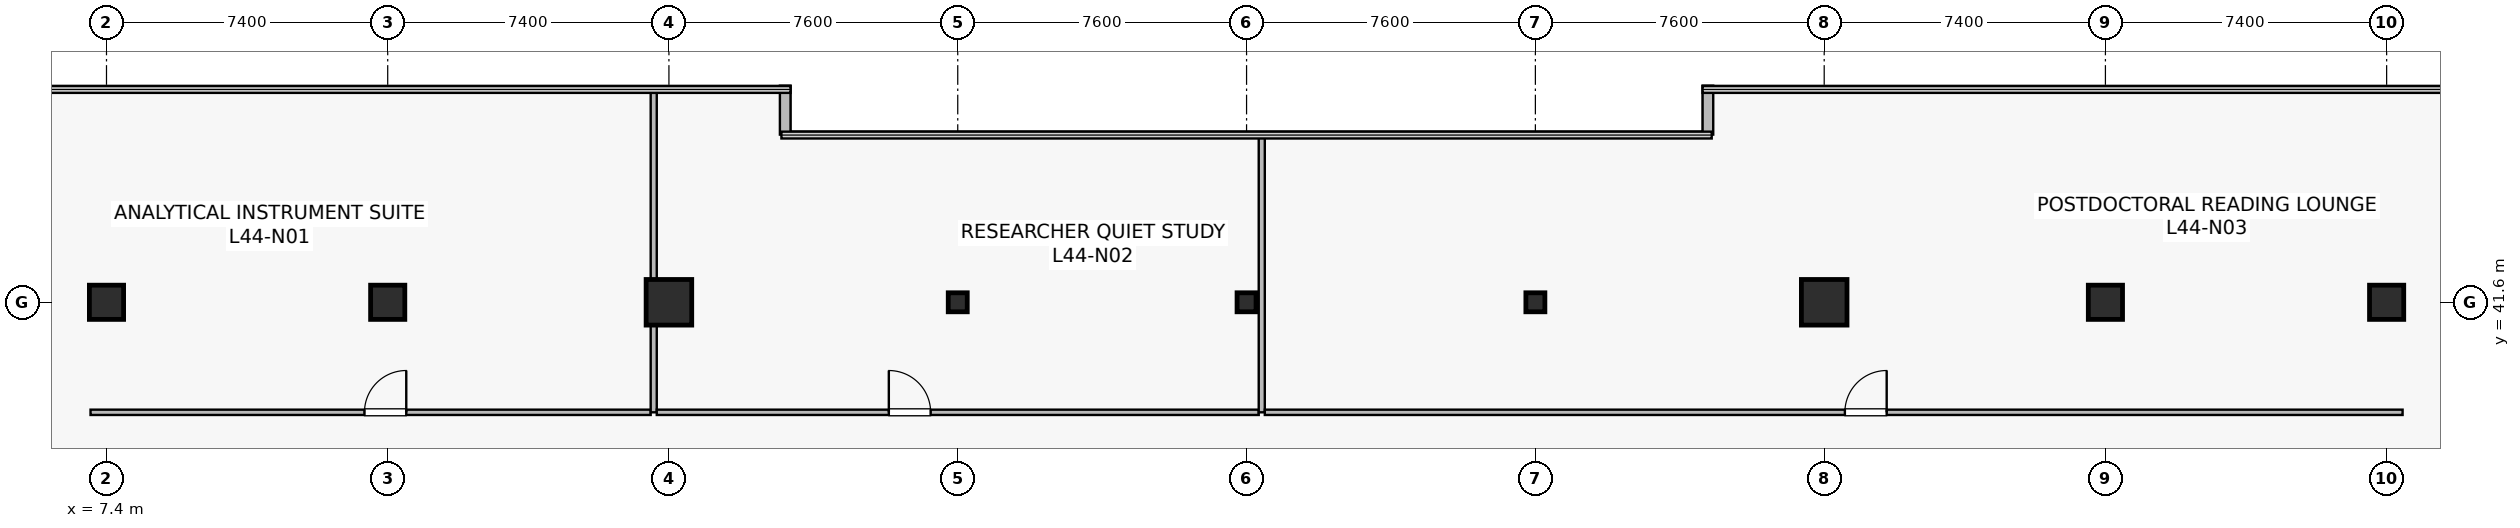
"""IFC4 building model, lengths in metres.
Left out: names, types, materials, properties, quantities, classifications, styles, units other than length and angle.
Written with IfcOpenShell. Run it as: python <this file> out.ifc"""

import sys

from ifc_helpers import new_model, si_unit, direction, frame, frame_2d, origin, origin_2d, place, context, subcontext, project, spatial, rectangle, hollow_rectangle, extrude, source, transform, mapped, element, fill, save


model = new_model("IFC4")
c1 = context("Model", 3, precision=1e-05, world=origin(), true_north=direction((0.0, 1.0)))
c2 = subcontext(c1, "Body", "Model", "MODEL_VIEW")
j1 = project(units=[si_unit("LENGTHUNIT", "METRE"), si_unit("PLANEANGLEUNIT", "RADIAN")], contexts=[c1])
p1 = place(None, origin())
s1 = spatial("IfcSite", under=j1, at=p1, CompositionType="ELEMENT")
p2 = place(p1, origin())
s2 = spatial("IfcBuilding", under=s1, at=p2, CompositionType="ELEMENT")
p3 = place(p2, frame((0.0, 0.0, 183.0)))
s3 = spatial("IfcBuildingStorey", under=s2, at=p3, CompositionType="ELEMENT", Elevation=183.0)
m1 = source(origin(), c2, "Body", "SweptSolid", [
    extrude(rectangle(XDim=0.9, YDim=0.9, at=origin_2d()), origin(), (0.0, 0.0, 1.0), 4.1),
])
p4 = place(p3, frame((14.8, 41.6, 0.0), z_axis=(0.0, 0.0, 1.0), x_axis=(1.0, 0.0, 0.0)))
e1 = element("IfcColumn", 1, at=p4, inside=s3, PredefinedType="COLUMN", context=c2, shape_type="MappedRepresentation", body=[
    mapped(m1, transform((0.0, 0.0, 0.0), scale=1.0)),
])
m2 = source(origin(), c2, "Body", "SweptSolid", [
    extrude(rectangle(XDim=1.2, YDim=1.2, at=origin_2d()), origin(), (0.0, 0.0, 1.0), 4.1),
])
for number, where, z_axis, x_axis in (
    (2, (22.2, 41.6, 0.0), (0.0, 0.0, 1.0), (1.0, 0.0, 0.0)),
    (3, (52.6, 41.6, 0.0), (0.0, 0.0, 1.0), (1.0, 0.0, 0.0)),
):
    element("IfcColumn", number, at=place(p3, frame(where, z_axis=z_axis, x_axis=x_axis)), inside=s3, PredefinedType="COLUMN", context=c2, shape_type="MappedRepresentation", body=[
        mapped(m2, transform((0.0, 0.0, 0.0), scale=1.0)),
    ])
for number, where, z_axis, x_axis in (
    (4, (60.0, 41.6, 0.0), (0.0, 0.0, 1.0), (1.0, 0.0, 0.0)),
    (5, (7.4, 41.6, 0.0), (0.0, 0.0, 1.0), (1.0, 0.0, 0.0)),
    (6, (67.4, 41.6, 0.0), (0.0, 0.0, 1.0), (1.0, 0.0, 0.0)),
):
    element("IfcColumn", number, at=place(p3, frame(where, z_axis=z_axis, x_axis=x_axis)), inside=s3, PredefinedType="COLUMN", context=c2, shape_type="MappedRepresentation", body=[
        mapped(m1, transform((0.0, 0.0, 0.0), scale=1.0)),
    ])
m3 = source(origin(), c2, "Body", "SweptSolid", [
    extrude(hollow_rectangle(XDim=0.5, YDim=0.5, WallThickness=0.022, at=origin_2d()), origin(), (0.0, 0.0, 1.0), 4.1),
])
for number, where, z_axis, x_axis in (
    (7, (29.8, 41.6, 0.0), (0.0, 0.0, 1.0), (1.0, 0.0, 0.0)),
    (8, (37.4, 41.6, 0.0), (0.0, 0.0, 1.0), (1.0, 0.0, 0.0)),
    (9, (45.0, 41.6, 0.0), (0.0, 0.0, 1.0), (1.0, 0.0, 0.0)),
):
    element("IfcColumn", number, at=place(p3, frame(where, z_axis=z_axis, x_axis=x_axis)), inside=s3, PredefinedType="COLUMN", context=c2, shape_type="MappedRepresentation", body=[
        mapped(m3, transform((0.0, 0.0, 0.0), scale=1.0)),
    ])
for number, where, z_axis, x_axis in (
    (10, (49.54, 47.3, 0.0), (0.0, 0.0, 1.0), (0.0, -1.0, 0.0)),
    (11, (25.26, 46.012, 0.0), (0.0, 0.0, 1.0), (0.0, 1.0, 0.0)),
):
    element("IfcWall", number, at=place(p3, frame(where, z_axis=z_axis, x_axis=x_axis)), inside=s3, PredefinedType="STANDARD", context=c2, shape_type="SweptSolid", body=[
        extrude(rectangle(XDim=1.288, YDim=0.28, at=frame_2d((0.644, 0.0))), origin(), (0.0, 0.0, 1.0), 3.79),
    ])
p5 = place(p3, frame((6.98, 38.705, 0.0), z_axis=(0.0, 0.0, 1.0), x_axis=(1.0, 0.0, 0.0)))
e12 = element("IfcWall", 12, at=p5, inside=s3, PredefinedType="PARTITIONING", context=c2, shape_type="SweptSolid", body=[
    extrude(rectangle(XDim=14.74, YDim=0.14, at=frame_2d((7.37, 0.0))), origin(), (0.0, 0.0, 1.0), 3.187),
])
p6 = place(p5, frame((7.208, 0.0, 0.0)))
e13 = element("IfcOpeningElement", 13, at=p6, cuts=e12, PredefinedType="OPENING", context=c2, shape_type="SweptSolid", body=[
    extrude(rectangle(XDim=1.1, YDim=2.18, at=frame_2d((0.55, 1.09))), frame((0.0, 0.08, 0.0), z_axis=(0.0, -1.0, 0.0), x_axis=(1.0, 0.0, 0.0)), (0.0, 0.0, 1.0), 0.16),
])
p7 = place(p3, frame((21.8, 38.705, 0.0), z_axis=(0.0, 0.0, 1.0), x_axis=(0.0, 1.0, 0.0)))
e14 = element("IfcWall", 14, at=p7, inside=s3, PredefinedType="PARTITIONING", context=c2, shape_type="SweptSolid", body=[
    extrude(rectangle(XDim=8.485, YDim=0.16, at=frame_2d((4.242, 0.0))), origin(), (0.0, 0.0, 1.0), 3.075),
])
p8 = place(p3, frame((21.88, 38.705, 0.0), z_axis=(0.0, 0.0, 1.0), x_axis=(1.0, 0.0, 0.0)))
e15 = element("IfcWall", 15, at=p8, inside=s3, PredefinedType="PARTITIONING", context=c2, shape_type="SweptSolid", body=[
    extrude(rectangle(XDim=15.84, YDim=0.14, at=frame_2d((7.92, 0.0))), origin(), (0.0, 0.0, 1.0), 3.187),
])
p9 = place(p8, frame((6.106, 0.0, 0.0)))
e16 = element("IfcOpeningElement", 16, at=p9, cuts=e15, PredefinedType="OPENING", context=c2, shape_type="SweptSolid", body=[
    extrude(rectangle(XDim=1.1, YDim=2.18, at=frame_2d((0.55, 1.09))), frame((0.0, 0.08, 0.0), z_axis=(0.0, -1.0, 0.0), x_axis=(1.0, 0.0, 0.0)), (0.0, 0.0, 1.0), 0.16),
])
p10 = place(p3, frame((37.8, 38.705, 0.0), z_axis=(0.0, 0.0, 1.0), x_axis=(0.0, 1.0, 0.0)))
e17 = element("IfcWall", 17, at=p10, inside=s3, PredefinedType="PARTITIONING", context=c2, shape_type="SweptSolid", body=[
    extrude(rectangle(XDim=7.285, YDim=0.16, at=frame_2d((3.643, 0.0))), origin(), (0.0, 0.0, 1.0), 3.075),
])
p11 = place(p3, frame((37.88, 38.705, 0.0), z_axis=(0.0, 0.0, 1.0), x_axis=(1.0, 0.0, 0.0)))
e18 = element("IfcWall", 18, at=p11, inside=s3, PredefinedType="PARTITIONING", context=c2, shape_type="SweptSolid", body=[
    extrude(rectangle(XDim=29.94, YDim=0.14, at=frame_2d((14.97, 0.0))), origin(), (0.0, 0.0, 1.0), 3.187),
])
p12 = place(p11, frame((15.264, 0.0, 0.0)))
e19 = element("IfcOpeningElement", 19, at=p12, cuts=e18, PredefinedType="OPENING", context=c2, shape_type="SweptSolid", body=[
    extrude(rectangle(XDim=1.1, YDim=2.18, at=frame_2d((0.55, 1.09))), frame((0.0, 0.08, 0.0), z_axis=(0.0, -1.0, 0.0), x_axis=(1.0, 0.0, 0.0)), (0.0, 0.0, 1.0), 0.16),
])
m4 = source(origin(), c2, "Body", "SweptSolid", [
    extrude(rectangle(XDim=1.1, YDim=2.18, at=frame_2d((0.55, 1.09))), frame((0.0, 0.025, 0.0), z_axis=(0.0, -1.0, 0.0), x_axis=(1.0, 0.0, 0.0)), (0.0, 0.0, 1.0), 0.05),
])
p13 = place(p6, origin())
e20 = element("IfcDoor", 20, at=p13, inside=s3, OperationType="SINGLE_SWING_RIGHT", PredefinedType="DOOR", context=c2, shape_type="MappedRepresentation", body=[
    mapped(m4, transform((0.0, 0.0, 0.0), scale=1.0)),
])
fill(e13, e20)
p14 = place(p9, origin())
e21 = element("IfcDoor", 21, at=p14, inside=s3, OperationType="SINGLE_SWING_LEFT", PredefinedType="DOOR", context=c2, shape_type="MappedRepresentation", body=[
    mapped(m4, transform((0.0, 0.0, 0.0), scale=1.0)),
])
fill(e16, e21)
p15 = place(p12, origin())
e22 = element("IfcDoor", 22, at=p15, inside=s3, OperationType="SINGLE_SWING_RIGHT", PredefinedType="DOOR", context=c2, shape_type="MappedRepresentation", body=[
    mapped(m4, transform((0.0, 0.0, 0.0), scale=1.0)),
])
fill(e19, e22)
save(model, sys.argv[1])
